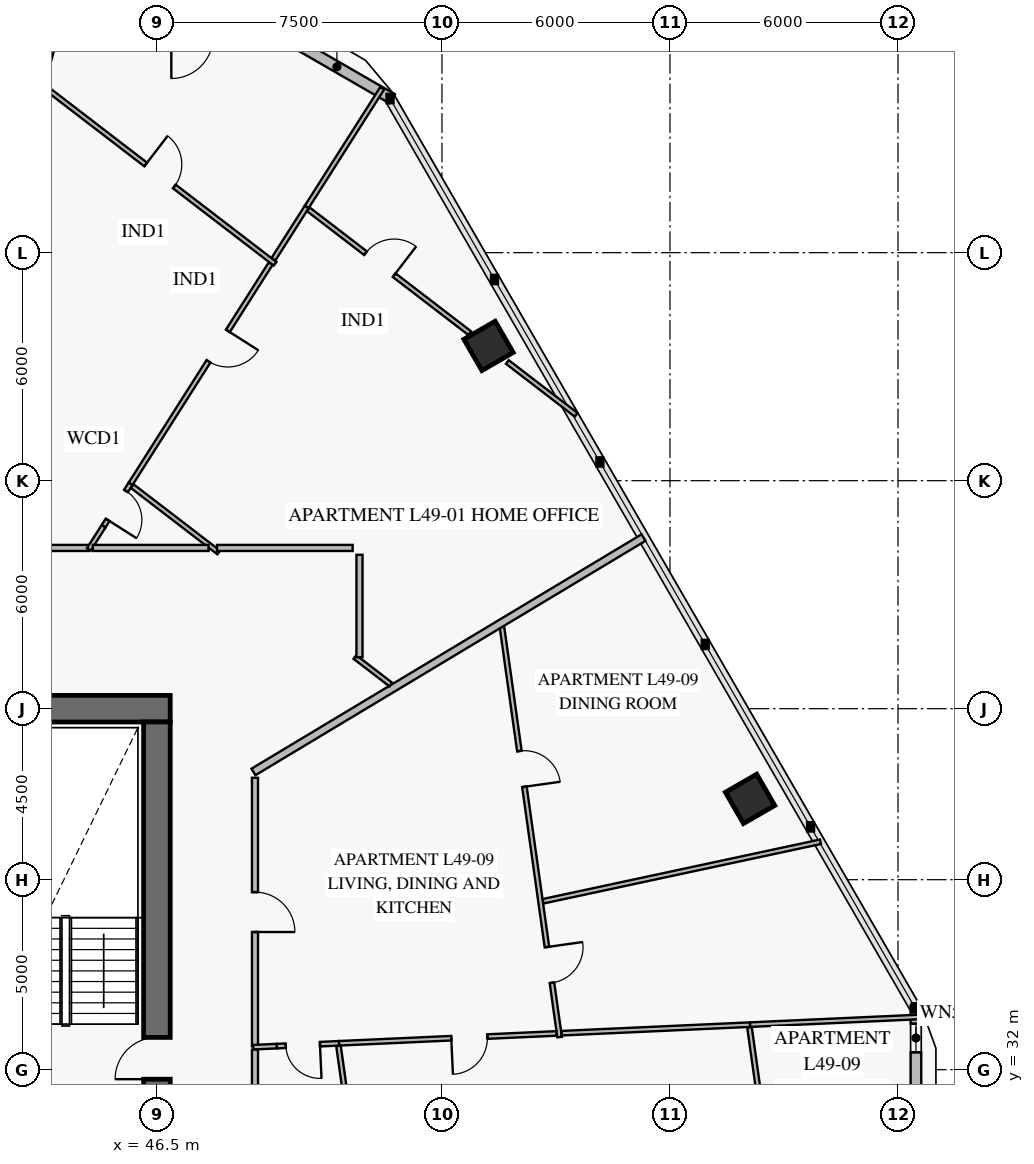
"""IFC4 building model, lengths in metres.
Left out: names, types, materials, properties, quantities, classifications, styles, units other than length and angle.
Written with IfcOpenShell. Run it as: python <this file> out.ifc"""

import sys

from ifc_helpers import new_model, si_unit, direction, frame, frame_2d, origin, origin_2d, place, context, subcontext, project, spatial, rectangle, extrude, element, fill, save


model = new_model("IFC4")
c1 = context("Model", 3, precision=1e-05, world=origin(), true_north=direction((0.0, 1.0)))
c2 = subcontext(c1, "Body", "Model", "MODEL_VIEW")
j1 = project(units=[si_unit("LENGTHUNIT", "METRE"), si_unit("PLANEANGLEUNIT", "RADIAN")], contexts=[c1])
p1 = place(None, origin())
s1 = spatial("IfcSite", under=j1, at=p1, CompositionType="ELEMENT")
p2 = place(p1, origin())
s2 = spatial("IfcBuilding", under=s1, at=p2, CompositionType="ELEMENT")
p3 = place(p2, frame((0.0, 0.0, 196.0)))
s3 = spatial("IfcBuildingStorey", under=s2, at=p3, CompositionType="ELEMENT", Elevation=196.0)
p4 = place(p3, frame((46.85, 41.5, 0.0), z_axis=(0.0, 0.0, 1.0), x_axis=(-1.0, 0.0, 0.0)))
e1 = element("IfcWall", 1, at=p4, inside=s3, PredefinedType="SHEAR", context=c2, shape_type="SweptSolid", body=[
    extrude(rectangle(XDim=7.9, YDim=0.7, at=frame_2d((3.95, 0.0))), origin(), (0.0, 0.0, 1.0), 3.8),
])
p5 = place(p3, frame((46.5, 22.85, 0.0), z_axis=(0.0, 0.0, 1.0), x_axis=(0.0, 1.0, 0.0)))
e2 = element("IfcWall", 2, at=p5, inside=s3, PredefinedType="SHEAR", context=c2, shape_type="SweptSolid", body=[
    extrude(rectangle(XDim=18.3, YDim=0.7, at=frame_2d((9.15, 0.0))), origin(), (0.0, 0.0, 1.0), 3.8),
])
p6 = place(p5, frame((8.9, 0.0, 0.0)))
e3 = element("IfcOpeningElement", 3, at=p6, cuts=e2, PredefinedType="OPENING", context=c2, shape_type="SweptSolid", body=[
    extrude(rectangle(XDim=1.1, YDim=2.15, at=frame_2d((0.55, 1.075))), frame((0.0, 0.362, 0.0), z_axis=(0.0, -1.0, 0.0), x_axis=(1.0, 0.0, 0.0)), (0.0, 0.0, 1.0), 0.724),
])
for number, where, z_axis, x_axis in (
    (4, (62.108, 39.126, 0.0), (0.0, 0.0, 1.0), (-0.5, 0.866, 0.0)),
    (5, (55.226, 51.047, 0.0), (0.0, 0.0, 1.0), (-0.5, 0.866, 0.0)),
):
    element("IfcColumn", number, at=place(p3, frame(where, z_axis=z_axis, x_axis=x_axis)), inside=s3, PredefinedType="COLUMN", context=c2, shape_type="SweptSolid", body=[
        extrude(rectangle(XDim=0.95, YDim=0.95, at=origin_2d()), origin(), (0.0, 0.0, 1.0), 3.55),
    ])
p7 = place(p3, frame((49.779, 59.231, 0.0), z_axis=(0.0, 0.0, 1.0), x_axis=(0.866020068361, -0.500009241111, 0.0)))
e6 = element("IfcWall", 6, at=p7, inside=s3, PredefinedType="SOLIDWALL", context=c2, shape_type="SweptSolid", body=[
    extrude(rectangle(XDim=3.365, YDim=0.28, at=frame_2d((1.683, 0.0))), origin(), (0.0, 0.0, 1.0), 3.55),
])
p8 = place(p3, frame((66.472, 33.683, 0.0), z_axis=(0.0, 0.0, 1.0), x_axis=(0.0, -1.0, 0.0)))
e7 = element("IfcWall", 7, at=p8, inside=s3, PredefinedType="SOLIDWALL", context=c2, shape_type="SweptSolid", body=[
    extrude(rectangle(XDim=3.365, YDim=0.28, at=frame_2d((1.683, 0.0))), origin(), (0.0, 0.0, 1.0), 3.55),
])
p9 = place(p8, frame((0.473, 0.0, 0.85)))
e8 = element("IfcOpeningElement", 8, at=p9, cuts=e7, PredefinedType="OPENING", context=c2, shape_type="SweptSolid", body=[
    extrude(rectangle(XDim=0.75, YDim=1.5, at=frame_2d((0.375, 0.75))), frame((0.0, 0.152, 0.0), z_axis=(0.0, -1.0, 0.0), x_axis=(1.0, 0.0, 0.0)), (0.0, 0.0, 1.0), 0.304),
])
p10 = place(p3, frame((49.609, 53.208, 0.0), z_axis=(0.0, 0.0, 1.0), x_axis=(-0.793348849006, 0.608767282121, 0.0)))
e9 = element("IfcWall", 9, at=p10, inside=s3, PredefinedType="PARTITIONING", context=c2, shape_type="SweptSolid", body=[
    extrude(rectangle(XDim=7.632, YDim=0.12, at=frame_2d((3.816, 0.0))), origin(), (0.0, 0.0, 1.0), 2.87),
])
p11 = place(p10, frame((3.341, 0.0, 0.0)))
e10 = element("IfcOpeningElement", 10, at=p11, cuts=e9, PredefinedType="OPENING", context=c2, shape_type="SweptSolid", body=[
    extrude(rectangle(XDim=0.95, YDim=2.1, at=frame_2d((0.475, 1.05))), frame((0.0, 0.072, 0.0), z_axis=(0.0, -1.0, 0.0), x_axis=(1.0, 0.0, 0.0)), (0.0, 0.0, 1.0), 0.144),
])
p12 = place(p3, frame((45.096, 46.3, 0.0), z_axis=(0.0, 0.0, 1.0), x_axis=(0.53661359275, 0.843828093913, 0.0)))
e11 = element("IfcWall", 11, at=p12, inside=s3, PredefinedType="PARTITIONING", context=c2, shape_type="SweptSolid", body=[
    extrude(rectangle(XDim=1.327, YDim=0.12, at=frame_2d((0.664, 0.0))), origin(), (0.0, 0.0, 1.0), 3.55),
])
p13 = place(p12, frame((0.2, 0.0, 0.0)))
e12 = element("IfcOpeningElement", 12, at=p13, cuts=e11, PredefinedType="OPENING", context=c2, shape_type="SweptSolid", body=[
    extrude(rectangle(XDim=0.9, YDim=2.1, at=frame_2d((0.45, 1.05))), frame((0.0, 0.072, 0.0), z_axis=(0.0, -1.0, 0.0), x_axis=(1.0, 0.0, 0.0)), (0.0, 0.0, 1.0), 0.144),
])
p14 = place(p3, frame((45.808, 47.42, 0.0), z_axis=(0.0, 0.0, 1.0), x_axis=(0.536718974009, 0.843761069817, 0.0)))
e13 = element("IfcWall", 13, at=p14, inside=s3, PredefinedType="PARTITIONING", context=c2, shape_type="SweptSolid", body=[
    extrude(rectangle(XDim=6.864, YDim=0.12, at=frame_2d((3.432, 0.0))), origin(), (0.0, 0.0, 1.0), 3.55),
])
p15 = place(p14, frame((3.817, 0.0, 0.0)))
e14 = element("IfcOpeningElement", 14, at=p15, cuts=e13, PredefinedType="OPENING", context=c2, shape_type="SweptSolid", body=[
    extrude(rectangle(XDim=0.95, YDim=2.1, at=frame_2d((0.475, 1.05))), frame((0.0, 0.072, 0.0), z_axis=(0.0, -1.0, 0.0), x_axis=(1.0, 0.0, 0.0)), (0.0, 0.0, 1.0), 0.144),
])
p16 = place(p3, frame((49.566, 53.326, 0.0), z_axis=(0.0, 0.0, 1.0), x_axis=(0.53659490955, 0.843839974785, 0.0)))
e15 = element("IfcWall", 15, at=p16, inside=s3, PredefinedType="PARTITIONING", context=c2, shape_type="SweptSolid", body=[
    extrude(rectangle(XDim=1.633, YDim=0.12, at=frame_2d((0.816, 0.0))), origin(), (0.0, 0.0, 1.0), 2.87),
])
p17 = place(p3, frame((54.73, 51.382, 0.0), z_axis=(0.0, 0.0, 1.0), x_axis=(-0.793330324721, 0.60879142231, 0.0)))
e16 = element("IfcWall", 16, at=p17, inside=s3, PredefinedType="PARTITIONING", context=c2, shape_type="SweptSolid", body=[
    extrude(rectangle(XDim=5.354, YDim=0.12, at=frame_2d((2.677, 0.0))), origin(), (0.0, 0.0, 1.0), 2.87),
])
p18 = place(p17, frame((2.506, 0.0, 0.0)))
e17 = element("IfcOpeningElement", 17, at=p18, cuts=e16, PredefinedType="OPENING", context=c2, shape_type="SweptSolid", body=[
    extrude(rectangle(XDim=0.95, YDim=2.1, at=frame_2d((0.475, 1.05))), frame((0.0, 0.072, 0.0), z_axis=(0.0, -1.0, 0.0), x_axis=(1.0, 0.0, 0.0)), (0.0, 0.0, 1.0), 0.144),
])
p19 = place(p3, frame((44.71, 45.73, 0.0), z_axis=(0.0, 0.0, 1.0), x_axis=(-1.0, 0.0, 0.0)))
e18 = element("IfcWall", 18, at=p19, inside=s3, PredefinedType="PARTITIONING", context=c2, shape_type="SweptSolid", body=[
    extrude(rectangle(XDim=4.622, YDim=0.16, at=frame_2d((2.311, 0.0))), origin(), (0.0, 0.0, 1.0), 3.55),
])
p20 = place(p19, frame((1.786, 0.0, 0.0)))
e19 = element("IfcOpeningElement", 19, at=p20, cuts=e18, PredefinedType="OPENING", context=c2, shape_type="SweptSolid", body=[
    extrude(rectangle(XDim=1.05, YDim=2.15, at=frame_2d((0.525, 1.075))), frame((0.0, 0.092, 0.0), z_axis=(0.0, -1.0, 0.0), x_axis=(1.0, 0.0, 0.0)), (0.0, 0.0, 1.0), 0.184),
])
p21 = place(p3, frame((57.095, 32.858, 0.0), z_axis=(0.0, 0.0, 1.0), x_axis=(-0.13917519047, 0.990267775078, 0.0)))
e20 = element("IfcWall", 20, at=p21, inside=s3, PredefinedType="PARTITIONING", context=c2, shape_type="SweptSolid", body=[
    extrude(rectangle(XDim=10.897, YDim=0.12, at=frame_2d((5.448, 0.0))), origin(), (0.0, 0.0, 1.0), 2.9),
])
p22 = place(p21, frame((1.443, 0.0, 0.0)))
e21 = element("IfcOpeningElement", 21, at=p22, cuts=e20, PredefinedType="OPENING", context=c2, shape_type="SweptSolid", body=[
    extrude(rectangle(XDim=0.95, YDim=2.1, at=frame_2d((0.475, 1.05))), frame((0.0, 0.072, 0.0), z_axis=(0.0, -1.0, 0.0), x_axis=(1.0, 0.0, 0.0)), (0.0, 0.0, 1.0), 0.144),
])
p23 = place(p21, frame((6.651, 0.0, 0.0)))
e22 = element("IfcOpeningElement", 22, at=p23, cuts=e20, PredefinedType="OPENING", context=c2, shape_type="SweptSolid", body=[
    extrude(rectangle(XDim=0.95, YDim=2.1, at=frame_2d((0.475, 1.05))), frame((0.0, 0.072, 0.0), z_axis=(0.0, -1.0, 0.0), x_axis=(1.0, 0.0, 0.0)), (0.0, 0.0, 1.0), 0.144),
])
p24 = place(p3, frame((49.65, 32.62, 0.0), z_axis=(0.0, 0.0, 1.0), x_axis=(0.998968234181, 0.045414393056, 0.0)))
e23 = element("IfcWall", 23, at=p24, inside=s3, PredefinedType="PARTITIONING", context=c2, shape_type="SweptSolid", body=[
    extrude(rectangle(XDim=1.645, YDim=0.12, at=frame_2d((0.823, 0.0))), origin(), (0.0, 0.0, 1.0), 3.55),
])
p25 = place(p24, frame((0.241, 0.0, 0.0)))
e24 = element("IfcOpeningElement", 24, at=p25, cuts=e23, PredefinedType="OPENING", context=c2, shape_type="SweptSolid", body=[
    extrude(rectangle(XDim=0.9, YDim=2.1, at=frame_2d((0.45, 1.05))), frame((0.0, 0.072, 0.0), z_axis=(0.0, -1.0, 0.0), x_axis=(1.0, 0.0, 0.0)), (0.0, 0.0, 1.0), 0.144),
])
p26 = place(p3, frame((51.293, 32.695, 0.0), z_axis=(0.0, 0.0, 1.0), x_axis=(0.99897231705, 0.045324494132, 0.0)))
e25 = element("IfcWall", 25, at=p26, inside=s3, PredefinedType="PARTITIONING", context=c2, shape_type="SweptSolid", body=[
    extrude(rectangle(XDim=5.726, YDim=0.12, at=frame_2d((2.863, 0.0))), origin(), (0.0, 0.0, 1.0), 3.55),
])
p27 = place(p26, frame((2.955, 0.0, 0.0)))
e26 = element("IfcOpeningElement", 26, at=p27, cuts=e25, PredefinedType="OPENING", context=c2, shape_type="SweptSolid", body=[
    extrude(rectangle(XDim=0.95, YDim=2.1, at=frame_2d((0.475, 1.05))), frame((0.0, 0.072, 0.0), z_axis=(0.0, -1.0, 0.0), x_axis=(1.0, 0.0, 0.0)), (0.0, 0.0, 1.0), 0.144),
])
p28 = place(p3, frame((57.15, 32.96, 0.0), z_axis=(0.0, 0.0, 1.0), x_axis=(0.998970871776, 0.04535633741, 0.0)))
e27 = element("IfcWall", 27, at=p28, inside=s3, PredefinedType="PARTITIONING", context=c2, shape_type="SweptSolid", body=[
    extrude(rectangle(XDim=4.963, YDim=0.12, at=frame_2d((2.481, 0.0))), origin(), (0.0, 0.0, 1.0), 2.87),
])
p29 = place(p3, frame((63.254, 24.848, 0.0), z_axis=(0.0, 0.0, 1.0), x_axis=(-0.139181804835, 0.990266845453, 0.0)))
e28 = element("IfcWall", 28, at=p29, inside=s3, PredefinedType="PARTITIONING", context=c2, shape_type="SweptSolid", body=[
    extrude(rectangle(XDim=8.35, YDim=0.12, at=frame_2d((4.175, 0.0))), origin(), (0.0, 0.0, 1.0), 2.87),
])
p30 = place(p29, frame((3.784, 0.0, 0.0)))
e29 = element("IfcOpeningElement", 29, at=p30, cuts=e28, PredefinedType="OPENING", context=c2, shape_type="SweptSolid", body=[
    extrude(rectangle(XDim=0.95, YDim=2.1, at=frame_2d((0.475, 1.05))), frame((0.0, 0.072, 0.0), z_axis=(0.0, -1.0, 0.0), x_axis=(1.0, 0.0, 0.0)), (0.0, 0.0, 1.0), 0.144),
])
p31 = place(p3, frame((49.08, 32.614, 0.0), z_axis=(0.0, 0.0, 1.0), x_axis=(0.0, 1.0, 0.0)))
e30 = element("IfcWall", 30, at=p31, inside=s3, PredefinedType="PARTITIONING", context=c2, shape_type="SweptSolid", body=[
    extrude(rectangle(XDim=7.067, YDim=0.16, at=frame_2d((3.534, 0.0))), origin(), (0.0, 0.0, 1.0), 2.9),
])
p32 = place(p31, frame((3.009, 0.0, 0.0)))
e31 = element("IfcOpeningElement", 31, at=p32, cuts=e30, PredefinedType="OPENING", context=c2, shape_type="SweptSolid", body=[
    extrude(rectangle(XDim=1.05, YDim=2.15, at=frame_2d((0.525, 1.075))), frame((0.0, 0.092, 0.0), z_axis=(0.0, -1.0, 0.0), x_axis=(1.0, 0.0, 0.0)), (0.0, 0.0, 1.0), 0.184),
])
p33 = place(p3, frame((49.04, 39.835, 0.0), z_axis=(0.0, 0.0, 1.0), x_axis=(0.857165332012, 0.515041351346, 0.0)))
e32 = element("IfcWall", 32, at=p33, inside=s3, PredefinedType="PARTITIONING", context=c2, shape_type="SweptSolid", body=[
    extrude(rectangle(XDim=11.974, YDim=0.2, at=frame_2d((5.987, 0.0))), origin(), (0.0, 0.0, 1.0), 2.87),
])
p34 = place(p3, frame((44.71, 45.693, 0.0), z_axis=(0.0, 0.0, 1.0), x_axis=(0.536809663503, 0.843703375108, 0.0)))
e33 = element("IfcWall", 33, at=p34, inside=s3, PredefinedType="PARTITIONING", context=c2, shape_type="SweptSolid", body=[
    extrude(rectangle(XDim=0.72, YDim=0.12, at=frame_2d((0.36, 0.0))), origin(), (0.0, 0.0, 1.0), 3.55),
])
p35 = place(p3, frame((50.442, 54.704, 0.0), z_axis=(0.0, 0.0, 1.0), x_axis=(0.536696164754, 0.84377557842, 0.0)))
e34 = element("IfcWall", 34, at=p35, inside=s3, PredefinedType="PARTITIONING", context=c2, shape_type="SweptSolid", body=[
    extrude(rectangle(XDim=3.7, YDim=0.12, at=frame_2d((1.85, 0.0))), origin(), (0.0, 0.0, 1.0), 3.55),
])
p36 = place(p3, frame((52.656, 42.134, 0.0), z_axis=(0.0, 0.0, 1.0), x_axis=(-0.793293229655, 0.608839758708, 0.0)))
e35 = element("IfcWall", 35, at=p36, inside=s3, PredefinedType="PARTITIONING", context=c2, shape_type="SweptSolid", body=[
    extrude(rectangle(XDim=1.193, YDim=0.12, at=frame_2d((0.596, 0.0))), origin(), (0.0, 0.0, 1.0), 3.55),
])
p37 = place(p3, frame((48.126, 45.61, 0.0), z_axis=(0.0, 0.0, 1.0), x_axis=(-0.793388621377, 0.608715447043, 0.0)))
e36 = element("IfcWall", 36, at=p37, inside=s3, PredefinedType="PARTITIONING", context=c2, shape_type="SweptSolid", body=[
    extrude(rectangle(XDim=2.87, YDim=0.12, at=frame_2d((1.435, 0.0))), origin(), (0.0, 0.0, 1.0), 3.55),
])
p38 = place(p3, frame((57.531, 49.233, 0.0), z_axis=(0.0, 0.0, 1.0), x_axis=(-0.793327349117, 0.608795299869, 0.0)))
e37 = element("IfcWall", 37, at=p38, inside=s3, PredefinedType="PARTITIONING", context=c2, shape_type="SweptSolid", body=[
    extrude(rectangle(XDim=2.282, YDim=0.12, at=frame_2d((1.141, 0.0))), origin(), (0.0, 0.0, 1.0), 3.55),
])
p39 = place(p3, frame((43.377, 57.727, 0.0), z_axis=(0.0, 0.0, 1.0), x_axis=(0.275721302425, 0.961237620669, 0.0)))
e38 = element("IfcWall", 38, at=p39, inside=s3, PredefinedType="PARTITIONING", context=c2, shape_type="SweptSolid", body=[
    extrude(rectangle(XDim=1.515, YDim=0.2, at=frame_2d((0.758, 0.0))), origin(), (0.0, 0.0, 1.0), 2.87),
])
p40 = place(p3, frame((56.662, 36.432, 0.0), z_axis=(0.0, 0.0, 1.0), x_axis=(0.977753085035, 0.209759158811, 0.0)))
e39 = element("IfcWall", 39, at=p40, inside=s3, PredefinedType="PARTITIONING", context=c2, shape_type="SweptSolid", body=[
    extrude(rectangle(XDim=7.464, YDim=0.12, at=frame_2d((3.732, 0.0))), origin(), (0.0, 0.0, 1.0), 2.87),
])
p41 = place(p3, frame((49.035, 32.592, 0.0), z_axis=(0.0, 0.0, 1.0), x_axis=(0.998959526244, 0.045605536133, 0.0)))
e40 = element("IfcWall", 40, at=p41, inside=s3, PredefinedType="PARTITIONING", context=c2, shape_type="SweptSolid", body=[
    extrude(rectangle(XDim=0.616, YDim=0.12, at=frame_2d((0.308, 0.0))), origin(), (0.0, 0.0, 1.0), 3.55),
])
p42 = place(p3, frame((62.107, 33.186, 0.0), z_axis=(0.0, 0.0, 1.0), x_axis=(0.998971026313, 0.045352933617, 0.0)))
e41 = element("IfcWall", 41, at=p42, inside=s3, PredefinedType="PARTITIONING", context=c2, shape_type="SweptSolid", body=[
    extrude(rectangle(XDim=4.452, YDim=0.12, at=frame_2d((2.226, 0.0))), origin(), (0.0, 0.0, 1.0), 2.87),
])
p43 = place(p3, frame((51.95, 27.838, 0.0), z_axis=(0.0, 0.0, 1.0), x_axis=(-0.139165856078, 0.990269086916, 0.0)))
e42 = element("IfcWall", 42, at=p43, inside=s3, PredefinedType="PARTITIONING", context=c2, shape_type="SweptSolid", body=[
    extrude(rectangle(XDim=4.835, YDim=0.12, at=frame_2d((2.417, 0.0))), origin(), (0.0, 0.0, 1.0), 3.55),
])
p44 = place(p3, frame((47.858, 45.73, 0.0), z_axis=(0.0, 0.0, 1.0), x_axis=(-1.0, 0.0, 0.0)))
e43 = element("IfcWall", 43, at=p44, inside=s3, PredefinedType="PARTITIONING", context=c2, shape_type="SweptSolid", body=[
    extrude(rectangle(XDim=3.044, YDim=0.16, at=frame_2d((1.522, 0.0))), origin(), (0.0, 0.0, 1.0), 3.55),
])
p45 = place(p3, frame((51.65, 45.73, 0.0), z_axis=(0.0, 0.0, 1.0), x_axis=(-1.0, 0.0, 0.0)))
e44 = element("IfcWall", 44, at=p45, inside=s3, PredefinedType="PARTITIONING", context=c2, shape_type="SweptSolid", body=[
    extrude(rectangle(XDim=3.569, YDim=0.16, at=frame_2d((1.784, 0.0))), origin(), (0.0, 0.0, 1.0), 2.9),
])
p46 = place(p3, frame((51.83, 42.854, 0.0), z_axis=(0.0, 0.0, 1.0), x_axis=(0.0, 1.0, 0.0)))
e45 = element("IfcWall", 45, at=p46, inside=s3, PredefinedType="PARTITIONING", context=c2, shape_type="SweptSolid", body=[
    extrude(rectangle(XDim=2.697, YDim=0.16, at=frame_2d((1.348, 0.0))), origin(), (0.0, 0.0, 1.0), 3.15),
])
p47 = place(p3, frame((49.08, 30.8, 0.0), z_axis=(0.0, 0.0, 1.0), x_axis=(0.0, 1.0, 0.0)))
e46 = element("IfcWall", 46, at=p47, inside=s3, PredefinedType="PARTITIONING", context=c2, shape_type="SweptSolid", body=[
    extrude(rectangle(XDim=1.726, YDim=0.16, at=frame_2d((0.863, 0.0))), origin(), (0.0, 0.0, 1.0), 3.55),
])
p48 = place(p9, origin())
e47 = element("IfcWindow", 47, at=p48, inside=s3, PartitioningType="SINGLE_PANEL", PredefinedType="WINDOW", context=c2, shape_type="SweptSolid", body=[
    extrude(rectangle(XDim=0.75, YDim=1.5, at=frame_2d((0.375, 0.75))), frame((0.0, 0.03, 0.0), z_axis=(0.0, -1.0, 0.0), x_axis=(1.0, 0.0, 0.0)), (0.0, 0.0, 1.0), 0.06),
])
fill(e8, e47)
p49 = place(p6, origin())
e48 = element("IfcDoor", 48, at=p49, inside=s3, OperationType="SINGLE_SWING_LEFT", PredefinedType="USERDEFINED", context=c2, shape_type="SweptSolid", body=[
    extrude(rectangle(XDim=1.1, YDim=2.15, at=frame_2d((0.55, 1.075))), frame((0.0, 0.025, 0.0), z_axis=(0.0, -1.0, 0.0), x_axis=(1.0, 0.0, 0.0)), (0.0, 0.0, 1.0), 0.05),
])
fill(e3, e48)
p50 = place(p11, frame((0.95, 0.0, 0.0), z_axis=(0.0, 0.0, 1.0), x_axis=(-1.0, 0.0, 0.0)))
e49 = element("IfcDoor", 49, at=p50, inside=s3, OperationType="SINGLE_SWING_LEFT", PredefinedType="DOOR", context=c2, shape_type="SweptSolid", body=[
    extrude(rectangle(XDim=0.95, YDim=2.1, at=frame_2d((0.475, 1.05))), frame((0.0, 0.025, 0.0), z_axis=(0.0, -1.0, 0.0), x_axis=(1.0, 0.0, 0.0)), (0.0, 0.0, 1.0), 0.05),
])
fill(e10, e49)
p51 = place(p13, frame((0.9, 0.0, 0.0), z_axis=(0.0, 0.0, 1.0), x_axis=(-1.0, 0.0, 0.0)))
e50 = element("IfcDoor", 50, at=p51, inside=s3, OperationType="SINGLE_SWING_RIGHT", PredefinedType="DOOR", context=c2, shape_type="SweptSolid", body=[
    extrude(rectangle(XDim=0.9, YDim=2.1, at=frame_2d((0.45, 1.05))), frame((0.0, 0.025, 0.0), z_axis=(0.0, -1.0, 0.0), x_axis=(1.0, 0.0, 0.0)), (0.0, 0.0, 1.0), 0.05),
])
fill(e12, e50)
p52 = place(p15, frame((0.95, 0.0, 0.0), z_axis=(0.0, 0.0, 1.0), x_axis=(-1.0, 0.0, 0.0)))
e51 = element("IfcDoor", 51, at=p52, inside=s3, OperationType="SINGLE_SWING_LEFT", PredefinedType="DOOR", context=c2, shape_type="SweptSolid", body=[
    extrude(rectangle(XDim=0.95, YDim=2.1, at=frame_2d((0.475, 1.05))), frame((0.0, 0.025, 0.0), z_axis=(0.0, -1.0, 0.0), x_axis=(1.0, 0.0, 0.0)), (0.0, 0.0, 1.0), 0.05),
])
fill(e14, e51)
p53 = place(p18, frame((0.95, 0.0, 0.0), z_axis=(0.0, 0.0, 1.0), x_axis=(-1.0, 0.0, 0.0)))
e52 = element("IfcDoor", 52, at=p53, inside=s3, OperationType="SINGLE_SWING_RIGHT", PredefinedType="DOOR", context=c2, shape_type="SweptSolid", body=[
    extrude(rectangle(XDim=0.95, YDim=2.1, at=frame_2d((0.475, 1.05))), frame((0.0, 0.025, 0.0), z_axis=(0.0, -1.0, 0.0), x_axis=(1.0, 0.0, 0.0)), (0.0, 0.0, 1.0), 0.05),
])
fill(e17, e52)
p54 = place(p22, frame((0.95, 0.0, 0.0), z_axis=(0.0, 0.0, 1.0), x_axis=(-1.0, 0.0, 0.0)))
e53 = element("IfcDoor", 53, at=p54, inside=s3, OperationType="SINGLE_SWING_LEFT", PredefinedType="DOOR", context=c2, shape_type="SweptSolid", body=[
    extrude(rectangle(XDim=0.95, YDim=2.1, at=frame_2d((0.475, 1.05))), frame((0.0, 0.025, 0.0), z_axis=(0.0, -1.0, 0.0), x_axis=(1.0, 0.0, 0.0)), (0.0, 0.0, 1.0), 0.05),
])
fill(e21, e53)
p55 = place(p23, frame((0.95, 0.0, 0.0), z_axis=(0.0, 0.0, 1.0), x_axis=(-1.0, 0.0, 0.0)))
e54 = element("IfcDoor", 54, at=p55, inside=s3, OperationType="SINGLE_SWING_RIGHT", PredefinedType="DOOR", context=c2, shape_type="SweptSolid", body=[
    extrude(rectangle(XDim=0.95, YDim=2.1, at=frame_2d((0.475, 1.05))), frame((0.0, 0.025, 0.0), z_axis=(0.0, -1.0, 0.0), x_axis=(1.0, 0.0, 0.0)), (0.0, 0.0, 1.0), 0.05),
])
fill(e22, e54)
p56 = place(p25, frame((0.9, 0.0, 0.0), z_axis=(0.0, 0.0, 1.0), x_axis=(-1.0, 0.0, 0.0)))
e55 = element("IfcDoor", 55, at=p56, inside=s3, OperationType="SINGLE_SWING_LEFT", PredefinedType="DOOR", context=c2, shape_type="SweptSolid", body=[
    extrude(rectangle(XDim=0.9, YDim=2.1, at=frame_2d((0.45, 1.05))), frame((0.0, 0.025, 0.0), z_axis=(0.0, -1.0, 0.0), x_axis=(1.0, 0.0, 0.0)), (0.0, 0.0, 1.0), 0.05),
])
fill(e24, e55)
p57 = place(p27, frame((0.95, 0.0, 0.0), z_axis=(0.0, 0.0, 1.0), x_axis=(-1.0, 0.0, 0.0)))
e56 = element("IfcDoor", 56, at=p57, inside=s3, OperationType="SINGLE_SWING_RIGHT", PredefinedType="DOOR", context=c2, shape_type="SweptSolid", body=[
    extrude(rectangle(XDim=0.95, YDim=2.1, at=frame_2d((0.475, 1.05))), frame((0.0, 0.025, 0.0), z_axis=(0.0, -1.0, 0.0), x_axis=(1.0, 0.0, 0.0)), (0.0, 0.0, 1.0), 0.05),
])
fill(e26, e56)
p58 = place(p32, frame((1.05, 0.0, 0.0), z_axis=(0.0, 0.0, 1.0), x_axis=(-1.0, 0.0, 0.0)))
e57 = element("IfcDoor", 57, at=p58, inside=s3, OperationType="SINGLE_SWING_RIGHT", PredefinedType="DOOR", context=c2, shape_type="SweptSolid", body=[
    extrude(rectangle(XDim=1.05, YDim=2.15, at=frame_2d((0.525, 1.075))), frame((0.0, 0.025, 0.0), z_axis=(0.0, -1.0, 0.0), x_axis=(1.0, 0.0, 0.0)), (0.0, 0.0, 1.0), 0.05),
])
fill(e31, e57)
save(model, sys.argv[1])
